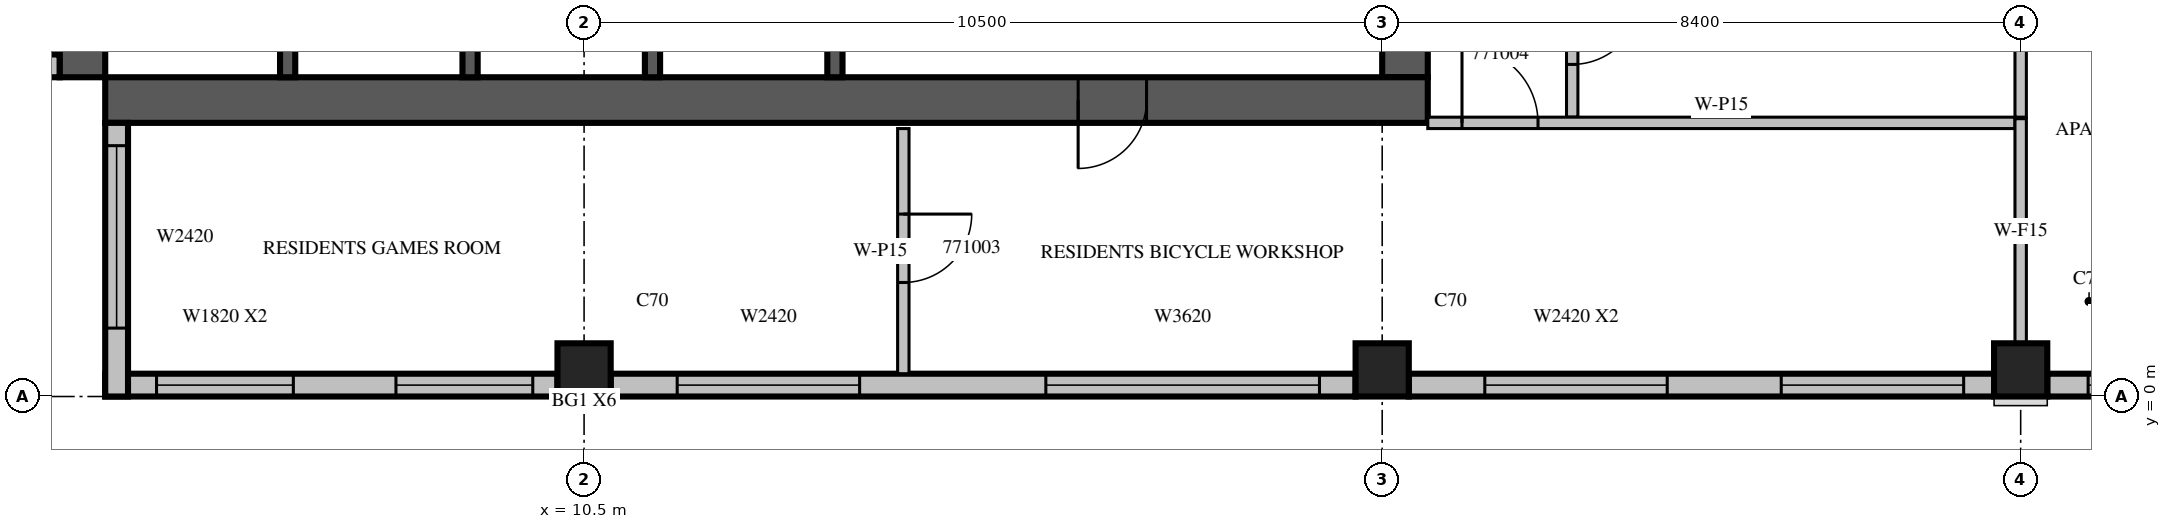
"""IFC4 building model, lengths in metres.
Left out: names, types, materials, properties, quantities, classifications, styles, units other than length and angle.
Written with IfcOpenShell. Run it as: python <this file> out.ifc"""

import sys

from ifc_helpers import new_model, si_unit, direction, frame, frame_2d, origin, origin_2d, place, context, subcontext, project, spatial, rectangle, extrude, source, transform, mapped, element, fill, save


model = new_model("IFC4")
c1 = context("Model", 3, precision=1e-05, world=origin(), true_north=direction((0.0, 1.0)))
c2 = subcontext(c1, "Body", "Model", "MODEL_VIEW")
j1 = project(units=[si_unit("LENGTHUNIT", "METRE"), si_unit("PLANEANGLEUNIT", "RADIAN")], contexts=[c1])
p1 = place(None, origin())
s1 = spatial("IfcSite", under=j1, at=p1, CompositionType="ELEMENT")
p2 = place(p1, origin())
s2 = spatial("IfcBuilding", under=s1, at=p2, CompositionType="ELEMENT")
p3 = place(p2, frame((0.0, 0.0, 309.0)))
s3 = spatial("IfcBuildingStorey", under=s2, at=p3, CompositionType="ELEMENT", Elevation=309.0)
m1 = source(origin(), c2, "Body", "SweptSolid", [
    extrude(rectangle(XDim=0.7, YDim=0.7, at=origin_2d()), origin(), (0.0, 0.0, 1.0), 3.5),
])
for number, where, z_axis, x_axis in (
    (1, (10.5, 0.35, 0.0), (0.0, 0.0, 1.0), (1.0, 0.0, 0.0)),
    (2, (21.0, 0.35, 0.0), (0.0, 0.0, 1.0), (1.0, 0.0, 0.0)),
    (3, (29.4, 0.35, 0.0), (0.0, 0.0, 1.0), (1.0, 0.0, 0.0)),
):
    element("IfcColumn", number, at=place(p3, frame(where, z_axis=z_axis, x_axis=x_axis)), inside=s3, PredefinedType="COLUMN", context=c2, shape_type="MappedRepresentation", body=[
        mapped(m1, transform((0.0, 0.0, 0.0), scale=1.0)),
    ])
m2 = source(origin(), c2, "Body", "SweptSolid", [
    extrude(rectangle(XDim=17.4, YDim=0.6, at=frame_2d((8.7, 0.0))), origin(), (0.0, 0.0, 1.0), 3.5),
])
p4 = place(p3, frame((3.9, 4.2, 0.0), z_axis=(0.0, 0.0, 1.0), x_axis=(0.0, 1.0, 0.0)))
e4 = element("IfcWall", 4, at=p4, inside=s3, PredefinedType="SHEAR", context=c2, shape_type="MappedRepresentation", body=[
    mapped(m2, transform((0.0, 0.0, 0.0), scale=1.0)),
])
m3 = source(origin(), c2, "Body", "SweptSolid", [
    extrude(rectangle(XDim=2.2, YDim=2.1, at=frame_2d((1.1, 1.05))), frame((0.0, 0.31, 0.0), z_axis=(0.0, -1.0, 0.0), x_axis=(1.0, 0.0, 0.0)), (0.0, 0.0, 1.0), 0.62),
])
p5 = place(p4, frame((4.2, 0.0, 0.0)))
e5 = element("IfcOpeningElement", 5, at=p5, cuts=e4, PredefinedType="OPENING", context=c2, shape_type="MappedRepresentation", body=[
    mapped(m3, transform((0.0, 0.0, 0.0), scale=1.0)),
])
m4 = source(origin(), c2, "Body", "SweptSolid", [
    extrude(rectangle(XDim=6.3, YDim=0.6, at=frame_2d((3.15, 0.0))), origin(), (0.0, 0.0, 1.0), 3.5),
])
p6 = place(p3, frame((21.3, 4.2, 0.0), z_axis=(0.0, 0.0, 1.0), x_axis=(0.0, 1.0, 0.0)))
e6 = element("IfcWall", 6, at=p6, inside=s3, PredefinedType="SHEAR", context=c2, shape_type="MappedRepresentation", body=[
    mapped(m4, transform((0.0, 0.0, 0.0), scale=1.0)),
])
p7 = place(p6, frame((4.0, 0.0, 0.0)))
e7 = element("IfcOpeningElement", 7, at=p7, cuts=e6, PredefinedType="OPENING", context=c2, shape_type="MappedRepresentation", body=[
    mapped(m3, transform((0.0, 0.0, 0.0), scale=1.0)),
])
p8 = place(p3, frame((4.2, 3.9, 0.0), z_axis=(0.0, 0.0, 1.0), x_axis=(1.0, 0.0, 0.0)))
e8 = element("IfcWall", 8, at=p8, inside=s3, PredefinedType="SHEAR", context=c2, shape_type="MappedRepresentation", body=[
    mapped(m2, transform((0.0, 0.0, 0.0), scale=1.0)),
])
m5 = source(origin(), c2, "Body", "SweptSolid", [
    extrude(rectangle(XDim=0.9, YDim=2.1, at=frame_2d((0.45, 1.05))), frame((0.0, 0.31, 0.0), z_axis=(0.0, -1.0, 0.0), x_axis=(1.0, 0.0, 0.0)), (0.0, 0.0, 1.0), 0.62),
])
p9 = place(p8, frame((12.8, 0.0, 0.0)))
e9 = element("IfcOpeningElement", 9, at=p9, cuts=e8, PredefinedType="OPENING", context=c2, shape_type="MappedRepresentation", body=[
    mapped(m5, transform((0.0, 0.0, 0.0), scale=1.0)),
])
m6 = source(origin(), c2, "Body", "SweptSolid", [
    extrude(rectangle(XDim=5.95, YDim=0.3, at=frame_2d((2.975, 0.0))), origin(), (0.0, 0.0, 1.0), 3.1),
])
p10 = place(p3, frame((4.2, 0.15, 0.0), z_axis=(0.0, 0.0, 1.0), x_axis=(1.0, 0.0, 0.0)))
e10 = element("IfcWall", 10, at=p10, inside=s3, PredefinedType="STANDARD", context=c2, shape_type="MappedRepresentation", body=[
    mapped(m6, transform((0.0, 0.0, 0.0), scale=1.0)),
])
m7 = source(origin(), c2, "Body", "SweptSolid", [
    extrude(rectangle(XDim=1.8, YDim=2.0, at=frame_2d((0.9, 1.0))), frame((0.0, 0.16, 0.0), z_axis=(0.0, -1.0, 0.0), x_axis=(1.0, 0.0, 0.0)), (0.0, 0.0, 1.0), 0.32),
])
p11 = place(p10, frame((0.675, 0.0, 0.6)))
e11 = element("IfcOpeningElement", 11, at=p11, cuts=e10, PredefinedType="OPENING", context=c2, shape_type="MappedRepresentation", body=[
    mapped(m7, transform((0.0, 0.0, 0.0), scale=1.0)),
])
p12 = place(p10, frame((3.825, 0.0, 0.6)))
e12 = element("IfcOpeningElement", 12, at=p12, cuts=e10, PredefinedType="OPENING", context=c2, shape_type="MappedRepresentation", body=[
    mapped(m7, transform((0.0, 0.0, 0.0), scale=1.0)),
])
m8 = source(origin(), c2, "Body", "SweptSolid", [
    extrude(rectangle(XDim=9.8, YDim=0.3, at=frame_2d((4.9, 0.0))), origin(), (0.0, 0.0, 1.0), 3.1),
])
p13 = place(p3, frame((10.85, 0.15, 0.0), z_axis=(0.0, 0.0, 1.0), x_axis=(1.0, 0.0, 0.0)))
e13 = element("IfcWall", 13, at=p13, inside=s3, PredefinedType="STANDARD", context=c2, shape_type="MappedRepresentation", body=[
    mapped(m8, transform((0.0, 0.0, 0.0), scale=1.0)),
])
m9 = source(origin(), c2, "Body", "SweptSolid", [
    extrude(rectangle(XDim=2.4, YDim=2.0, at=frame_2d((1.2, 1.0))), frame((0.0, 0.16, 0.0), z_axis=(0.0, -1.0, 0.0), x_axis=(1.0, 0.0, 0.0)), (0.0, 0.0, 1.0), 0.32),
])
p14 = place(p13, frame((0.875, 0.0, 0.6)))
e14 = element("IfcOpeningElement", 14, at=p14, cuts=e13, PredefinedType="OPENING", context=c2, shape_type="MappedRepresentation", body=[
    mapped(m9, transform((0.0, 0.0, 0.0), scale=1.0)),
])
m10 = source(origin(), c2, "Body", "SweptSolid", [
    extrude(rectangle(XDim=3.6, YDim=2.0, at=frame_2d((1.8, 1.0))), frame((0.0, 0.16, 0.0), z_axis=(0.0, -1.0, 0.0), x_axis=(1.0, 0.0, 0.0)), (0.0, 0.0, 1.0), 0.32),
])
p15 = place(p13, frame((5.725, 0.0, 0.6)))
e15 = element("IfcOpeningElement", 15, at=p15, cuts=e13, PredefinedType="OPENING", context=c2, shape_type="MappedRepresentation", body=[
    mapped(m10, transform((0.0, 0.0, 0.0), scale=1.0)),
])
m11 = source(origin(), c2, "Body", "SweptSolid", [
    extrude(rectangle(XDim=7.7, YDim=0.3, at=frame_2d((3.85, 0.0))), origin(), (0.0, 0.0, 1.0), 3.1),
])
p16 = place(p3, frame((21.35, 0.15, 0.0), z_axis=(0.0, 0.0, 1.0), x_axis=(1.0, 0.0, 0.0)))
e16 = element("IfcWall", 16, at=p16, inside=s3, PredefinedType="STANDARD", context=c2, shape_type="MappedRepresentation", body=[
    mapped(m11, transform((0.0, 0.0, 0.0), scale=1.0)),
])
p17 = place(p16, frame((1.0, 0.0, 0.6)))
e17 = element("IfcOpeningElement", 17, at=p17, cuts=e16, PredefinedType="OPENING", context=c2, shape_type="MappedRepresentation", body=[
    mapped(m9, transform((0.0, 0.0, 0.0), scale=1.0)),
])
p18 = place(p16, frame((4.9, 0.0, 0.6)))
e18 = element("IfcOpeningElement", 18, at=p18, cuts=e16, PredefinedType="OPENING", context=c2, shape_type="MappedRepresentation", body=[
    mapped(m9, transform((0.0, 0.0, 0.0), scale=1.0)),
])
p19 = place(p3, frame((29.75, 0.15, 0.0), z_axis=(0.0, 0.0, 1.0), x_axis=(1.0, 0.0, 0.0)))
e19 = element("IfcWall", 19, at=p19, inside=s3, PredefinedType="STANDARD", context=c2, shape_type="MappedRepresentation", body=[
    mapped(m11, transform((0.0, 0.0, 0.0), scale=1.0)),
])
m12 = source(origin(), c2, "Body", "SweptSolid", [
    extrude(rectangle(XDim=1.2, YDim=2.0, at=frame_2d((0.6, 1.0))), frame((0.0, 0.16, 0.0), z_axis=(0.0, -1.0, 0.0), x_axis=(1.0, 0.0, 0.0)), (0.0, 0.0, 1.0), 0.32),
])
p20 = place(p19, frame((0.537, 0.0, 0.6)))
e20 = element("IfcOpeningElement", 20, at=p20, cuts=e19, PredefinedType="OPENING", context=c2, shape_type="MappedRepresentation", body=[
    mapped(m12, transform((0.0, 0.0, 0.0), scale=1.0)),
])
p21 = place(p19, frame((6.062, 0.0, 0.6)))
e21 = element("IfcOpeningElement", 21, at=p21, cuts=e19, PredefinedType="OPENING", context=c2, shape_type="MappedRepresentation", body=[
    mapped(m12, transform((0.0, 0.0, 0.0), scale=1.0)),
])
m13 = source(origin(), c2, "Body", "SweptSolid", [
    extrude(rectangle(XDim=3.6, YDim=0.3, at=frame_2d((1.8, 0.0))), origin(), (0.0, 0.0, 1.0), 3.1),
])
p22 = place(p3, frame((0.0, 4.35, 0.0), z_axis=(0.0, 0.0, 1.0), x_axis=(1.0, 0.0, 0.0)))
e22 = element("IfcWall", 22, at=p22, inside=s3, PredefinedType="STANDARD", context=c2, shape_type="MappedRepresentation", body=[
    mapped(m13, transform((0.0, 0.0, 0.0), scale=1.0)),
])
p23 = place(p22, frame((0.9, 0.0, 0.6)))
e23 = element("IfcOpeningElement", 23, at=p23, cuts=e22, PredefinedType="OPENING", context=c2, shape_type="MappedRepresentation", body=[
    mapped(m9, transform((0.0, 0.0, 0.0), scale=1.0)),
])
p24 = place(p3, frame((4.35, 3.6, 0.0), z_axis=(0.0, 0.0, 1.0), x_axis=(0.0, -1.0, 0.0)))
e24 = element("IfcWall", 24, at=p24, inside=s3, PredefinedType="STANDARD", context=c2, shape_type="MappedRepresentation", body=[
    mapped(m13, transform((0.0, 0.0, 0.0), scale=1.0)),
])
p25 = place(p24, frame((0.3, 0.0, 0.6)))
e25 = element("IfcOpeningElement", 25, at=p25, cuts=e24, PredefinedType="OPENING", context=c2, shape_type="MappedRepresentation", body=[
    mapped(m9, transform((0.0, 0.0, 0.0), scale=1.0)),
])
m14 = source(origin(), c2, "Body", "SweptSolid", [
    extrude(rectangle(XDim=3.1, YDim=0.2, at=frame_2d((1.55, 0.0))), origin(), (0.0, 0.0, 1.0), 3.5),
])
for number, where, z_axis, x_axis in (
    (26, (6.6, 4.2, 0.0), (0.0, 0.0, 1.0), (0.0, 1.0, 0.0)),
    (27, (9.0, 4.2, 0.0), (0.0, 0.0, 1.0), (0.0, 1.0, 0.0)),
    (28, (11.4, 4.2, 0.0), (0.0, 0.0, 1.0), (0.0, 1.0, 0.0)),
):
    element("IfcWall", number, at=place(p3, frame(where, z_axis=z_axis, x_axis=x_axis)), inside=s3, PredefinedType="SOLIDWALL", context=c2, shape_type="MappedRepresentation", body=[
        mapped(m14, transform((0.0, 0.0, 0.0), scale=1.0)),
    ])
m15 = source(origin(), c2, "Body", "SweptSolid", [
    extrude(rectangle(XDim=3.1, YDim=0.2, at=frame_2d((1.55, 0.0))), origin(), (0.0, 0.0, 1.0), 3.1),
])
p26 = place(p3, frame((13.8, 4.2, 0.0), z_axis=(0.0, 0.0, 1.0), x_axis=(0.0, 1.0, 0.0)))
e29 = element("IfcWall", 29, at=p26, inside=s3, PredefinedType="SOLIDWALL", context=c2, shape_type="MappedRepresentation", body=[
    mapped(m15, transform((0.0, 0.0, 0.0), scale=1.0)),
])
m16 = source(origin(), c2, "Body", "SweptSolid", [
    extrude(rectangle(XDim=4.575, YDim=0.15, at=frame_2d((2.288, 0.0))), origin(), (0.0, 0.0, 1.0), 3.1),
])
p27 = place(p3, frame((23.5, 8.25, 0.0), z_axis=(0.0, 0.0, 1.0), x_axis=(0.0, -1.0, 0.0)))
e30 = element("IfcWall", 30, at=p27, inside=s3, PredefinedType="PARTITIONING", context=c2, shape_type="MappedRepresentation", body=[
    mapped(m16, transform((0.0, 0.0, 0.0), scale=1.0)),
])
m17 = source(origin(), c2, "Body", "SweptSolid", [
    extrude(rectangle(XDim=0.9, YDim=2.1, at=frame_2d((0.45, 1.05))), frame((0.0, 0.085, 0.0), z_axis=(0.0, -1.0, 0.0), x_axis=(1.0, 0.0, 0.0)), (0.0, 0.0, 1.0), 0.17),
])
p28 = place(p27, frame((2.981, 0.0, 0.0)))
e31 = element("IfcOpeningElement", 31, at=p28, cuts=e30, PredefinedType="OPENING", context=c2, shape_type="MappedRepresentation", body=[
    mapped(m17, transform((0.0, 0.0, 0.0), scale=1.0)),
])
p29 = place(p3, frame((29.4, 3.675, 0.0), z_axis=(0.0, 0.0, 1.0), x_axis=(0.0, 1.0, 0.0)))
e32 = element("IfcWall", 32, at=p29, inside=s3, PredefinedType="PARTITIONING", context=c2, shape_type="MappedRepresentation", body=[
    mapped(m16, transform((0.0, 0.0, 0.0), scale=1.0)),
])
m18 = source(origin(), c2, "Body", "SweptSolid", [
    extrude(rectangle(XDim=3.225, YDim=0.15, at=frame_2d((1.613, 0.0))), origin(), (0.0, 0.0, 1.0), 3.1),
])
p30 = place(p3, frame((14.7, 3.525, 0.0), z_axis=(0.0, 0.0, 1.0), x_axis=(0.0, -1.0, 0.0)))
e33 = element("IfcWall", 33, at=p30, inside=s3, PredefinedType="PARTITIONING", context=c2, shape_type="MappedRepresentation", body=[
    mapped(m18, transform((0.0, 0.0, 0.0), scale=1.0)),
])
p31 = place(p30, frame((1.125, 0.0, 0.0)))
e34 = element("IfcOpeningElement", 34, at=p31, cuts=e33, PredefinedType="OPENING", context=c2, shape_type="MappedRepresentation", body=[
    mapped(m17, transform((0.0, 0.0, 0.0), scale=1.0)),
])
m19 = source(origin(), c2, "Body", "SweptSolid", [
    extrude(rectangle(XDim=7.725, YDim=0.15, at=frame_2d((3.862, 0.0))), origin(), (0.0, 0.0, 1.0), 3.1),
])
p32 = place(p3, frame((21.6, 3.6, 0.0), z_axis=(0.0, 0.0, 1.0), x_axis=(1.0, 0.0, 0.0)))
e35 = element("IfcWall", 35, at=p32, inside=s3, PredefinedType="PARTITIONING", context=c2, shape_type="MappedRepresentation", body=[
    mapped(m19, transform((0.0, 0.0, 0.0), scale=1.0)),
])
m20 = source(origin(), c2, "Body", "SweptSolid", [
    extrude(rectangle(XDim=1.0, YDim=2.1, at=frame_2d((0.5, 1.05))), frame((0.0, 0.085, 0.0), z_axis=(0.0, -1.0, 0.0), x_axis=(1.0, 0.0, 0.0)), (0.0, 0.0, 1.0), 0.17),
])
p33 = place(p32, frame((0.45, 0.0, 0.0)))
e36 = element("IfcOpeningElement", 36, at=p33, cuts=e35, PredefinedType="OPENING", context=c2, shape_type="MappedRepresentation", body=[
    mapped(m20, transform((0.0, 0.0, 0.0), scale=1.0)),
])
m21 = source(origin(), c2, "Body", "SweptSolid", [
    extrude(rectangle(XDim=2.956, YDim=0.15, at=frame_2d((1.478, 0.0))), origin(), (0.0, 0.0, 1.0), 3.1),
])
p34 = place(p3, frame((29.4, 0.699, 0.0), z_axis=(0.0, 0.0, 1.0), x_axis=(0.0, 1.0, 0.0)))
e37 = element("IfcWall", 37, at=p34, inside=s3, PredefinedType="PARTITIONING", context=c2, shape_type="MappedRepresentation", body=[
    mapped(m21, transform((0.0, 0.0, 0.0), scale=1.0)),
])
m22 = source(origin(), c2, "Body", "SweptSolid", [
    extrude(rectangle(XDim=1.8, YDim=2.0, at=frame_2d((0.9, 1.0))), frame((0.0, 0.03, 0.0), z_axis=(0.0, -1.0, 0.0), x_axis=(1.0, 0.0, 0.0)), (0.0, 0.0, 1.0), 0.06),
])
p35 = place(p11, origin())
e38 = element("IfcWindow", 38, at=p35, inside=s3, PartitioningType="SINGLE_PANEL", PredefinedType="WINDOW", context=c2, shape_type="MappedRepresentation", body=[
    mapped(m22, transform((0.0, 0.0, 0.0), scale=1.0)),
])
fill(e11, e38)
p36 = place(p12, origin())
e39 = element("IfcWindow", 39, at=p36, inside=s3, PartitioningType="SINGLE_PANEL", PredefinedType="WINDOW", context=c2, shape_type="MappedRepresentation", body=[
    mapped(m22, transform((0.0, 0.0, 0.0), scale=1.0)),
])
fill(e12, e39)
m23 = source(origin(), c2, "Body", "SweptSolid", [
    extrude(rectangle(XDim=2.4, YDim=2.0, at=frame_2d((1.2, 1.0))), frame((0.0, 0.03, 0.0), z_axis=(0.0, -1.0, 0.0), x_axis=(1.0, 0.0, 0.0)), (0.0, 0.0, 1.0), 0.06),
])
p37 = place(p14, origin())
e40 = element("IfcWindow", 40, at=p37, inside=s3, PartitioningType="SINGLE_PANEL", PredefinedType="WINDOW", context=c2, shape_type="MappedRepresentation", body=[
    mapped(m23, transform((0.0, 0.0, 0.0), scale=1.0)),
])
fill(e14, e40)
m24 = source(origin(), c2, "Body", "SweptSolid", [
    extrude(rectangle(XDim=3.6, YDim=2.0, at=frame_2d((1.8, 1.0))), frame((0.0, 0.03, 0.0), z_axis=(0.0, -1.0, 0.0), x_axis=(1.0, 0.0, 0.0)), (0.0, 0.0, 1.0), 0.06),
])
p38 = place(p15, origin())
e41 = element("IfcWindow", 41, at=p38, inside=s3, PartitioningType="SINGLE_PANEL", PredefinedType="WINDOW", context=c2, shape_type="MappedRepresentation", body=[
    mapped(m24, transform((0.0, 0.0, 0.0), scale=1.0)),
])
fill(e15, e41)
p39 = place(p17, origin())
e42 = element("IfcWindow", 42, at=p39, inside=s3, PartitioningType="SINGLE_PANEL", PredefinedType="WINDOW", context=c2, shape_type="MappedRepresentation", body=[
    mapped(m23, transform((0.0, 0.0, 0.0), scale=1.0)),
])
fill(e17, e42)
p40 = place(p18, origin())
e43 = element("IfcWindow", 43, at=p40, inside=s3, PartitioningType="SINGLE_PANEL", PredefinedType="WINDOW", context=c2, shape_type="MappedRepresentation", body=[
    mapped(m23, transform((0.0, 0.0, 0.0), scale=1.0)),
])
fill(e18, e43)
m25 = source(origin(), c2, "Body", "SweptSolid", [
    extrude(rectangle(XDim=1.2, YDim=2.0, at=frame_2d((0.6, 1.0))), frame((0.0, 0.03, 0.0), z_axis=(0.0, -1.0, 0.0), x_axis=(1.0, 0.0, 0.0)), (0.0, 0.0, 1.0), 0.06),
])
p41 = place(p20, origin())
e44 = element("IfcWindow", 44, at=p41, inside=s3, PartitioningType="SINGLE_PANEL", PredefinedType="WINDOW", context=c2, shape_type="MappedRepresentation", body=[
    mapped(m25, transform((0.0, 0.0, 0.0), scale=1.0)),
])
fill(e20, e44)
p42 = place(p25, origin())
e45 = element("IfcWindow", 45, at=p42, inside=s3, PartitioningType="SINGLE_PANEL", PredefinedType="WINDOW", context=c2, shape_type="MappedRepresentation", body=[
    mapped(m23, transform((0.0, 0.0, 0.0), scale=1.0)),
])
fill(e25, e45)
m26 = source(origin(), c2, "Body", "SweptSolid", [
    extrude(rectangle(XDim=0.9, YDim=2.1, at=frame_2d((0.45, 1.05))), frame((0.0, 0.025, 0.0), z_axis=(0.0, -1.0, 0.0), x_axis=(1.0, 0.0, 0.0)), (0.0, 0.0, 1.0), 0.05),
])
p43 = place(p9, origin())
e46 = element("IfcDoor", 46, at=p43, inside=s3, OperationType="SINGLE_SWING_RIGHT", PredefinedType="DOOR", context=c2, shape_type="MappedRepresentation", body=[
    mapped(m26, transform((0.0, 0.0, 0.0), scale=1.0)),
])
fill(e9, e46)
p44 = place(p28, origin())
e47 = element("IfcDoor", 47, at=p44, inside=s3, OperationType="SINGLE_SWING_LEFT", PredefinedType="DOOR", context=c2, shape_type="MappedRepresentation", body=[
    mapped(m26, transform((0.0, 0.0, 0.0), scale=1.0)),
])
fill(e31, e47)
p45 = place(p31, origin())
e48 = element("IfcDoor", 48, at=p45, inside=s3, OperationType="SINGLE_SWING_LEFT", PredefinedType="DOOR", context=c2, shape_type="MappedRepresentation", body=[
    mapped(m26, transform((0.0, 0.0, 0.0), scale=1.0)),
])
fill(e34, e48)
m27 = source(origin(), c2, "Body", "SweptSolid", [
    extrude(rectangle(XDim=1.0, YDim=2.1, at=frame_2d((0.5, 1.05))), frame((0.0, 0.025, 0.0), z_axis=(0.0, -1.0, 0.0), x_axis=(1.0, 0.0, 0.0)), (0.0, 0.0, 1.0), 0.05),
])
p46 = place(p33, origin())
e49 = element("IfcDoor", 49, at=p46, inside=s3, OperationType="SINGLE_SWING_LEFT", PredefinedType="DOOR", context=c2, shape_type="MappedRepresentation", body=[
    mapped(m27, transform((0.0, 0.0, 0.0), scale=1.0)),
])
fill(e36, e49)
save(model, sys.argv[1])
